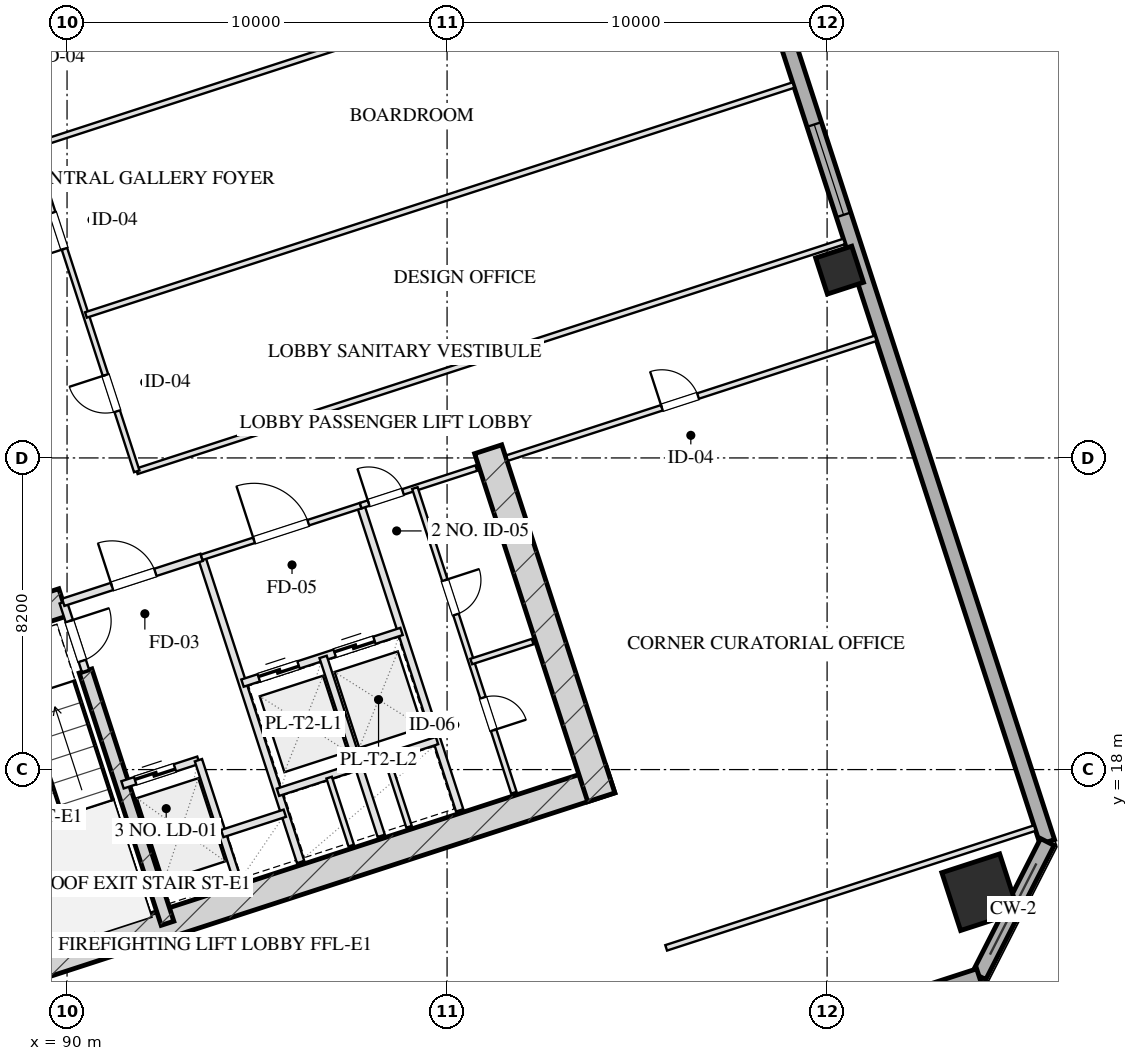
"""IFC4 building model, lengths in metres.
Left out: names, types, materials, properties, quantities, classifications, styles, units other than length and angle.
Written with IfcOpenShell. Run it as: python <this file> out.ifc"""

import sys

from ifc_helpers import new_model, si_unit, direction, frame, frame_2d, origin, origin_2d, place, context, subcontext, project, spatial, rectangle, hollow_rectangle, extrude, element, fill, save


model = new_model("IFC4")
c1 = context("Model", 3, precision=1e-05, world=origin(), true_north=direction((0.0, 1.0)))
c2 = subcontext(c1, "Body", "Model", "MODEL_VIEW")
j1 = project(units=[si_unit("LENGTHUNIT", "METRE"), si_unit("PLANEANGLEUNIT", "RADIAN")], contexts=[c1])
p1 = place(None, origin())
s1 = spatial("IfcSite", under=j1, at=p1, CompositionType="ELEMENT")
p2 = place(p1, origin())
s2 = spatial("IfcBuilding", under=s1, at=p2, CompositionType="ELEMENT")
p3 = place(p2, frame((0.0, 0.0, 30.0)))
s3 = spatial("IfcBuildingStorey", under=s2, at=p3, CompositionType="ELEMENT", Elevation=30.0)
p4 = place(p3, frame((88.559, 12.629, 0.0), z_axis=(0.0, 0.0, 1.0), x_axis=(0.951056072937, 0.309018358888, 0.0)))
e1 = element("IfcWall", 1, at=p4, inside=s3, PredefinedType="SHEAR", context=c2, shape_type="SweptSolid", body=[
    extrude(rectangle(XDim=16.55, YDim=0.75, at=frame_2d((8.275, 0.0))), origin(), (0.0, 0.0, 1.0), 4.0),
])
p5 = place(p3, frame((101.082, 26.429, 0.0), z_axis=(0.0, 0.0, 1.0), x_axis=(0.309016134813, -0.951056795583, 0.0)))
e2 = element("IfcWall", 2, at=p5, inside=s3, PredefinedType="SHEAR", context=c2, shape_type="SweptSolid", body=[
    extrude(rectangle(XDim=9.63, YDim=0.75, at=frame_2d((4.815, 0.0))), origin(), (0.0, 0.0, 1.0), 4.0),
])
p6 = place(p3, frame((90.486, 20.594, 0.0), z_axis=(0.0, 0.0, 1.0), x_axis=(0.309020428229, -0.951055400562, 0.0)))
e3 = element("IfcWall", 3, at=p6, inside=s3, PredefinedType="SHEAR", context=c2, shape_type="SweptSolid", body=[
    extrude(rectangle(XDim=6.98, YDim=0.35, at=frame_2d((3.49, 0.0))), origin(), (0.0, 0.0, 1.0), 4.0),
])
p7 = place(p3, frame((85.814, 21.074, 0.0), z_axis=(0.0, 0.0, 1.0), x_axis=(0.95106580992, 0.308988390074, 0.0)))
e4 = element("IfcWall", 4, at=p7, inside=s3, PredefinedType="SHEAR", context=c2, shape_type="SweptSolid", body=[
    extrude(rectangle(XDim=4.295, YDim=0.75, at=frame_2d((2.147, 0.0))), origin(), (0.0, 0.0, 1.0), 4.0),
])
p8 = place(p3, frame((114.027, 14.774, 0.0), z_axis=(0.0, 0.0, 1.0), x_axis=(0.951056516295, 0.309016994375, 0.0)))
e5 = element("IfcColumn", 5, at=p8, inside=s3, PredefinedType="COLUMN", context=c2, shape_type="SweptSolid", body=[
    extrude(hollow_rectangle(XDim=1.6, YDim=1.6, WallThickness=0.055, at=origin_2d()), origin(), (0.0, 0.0, 1.0), 4.001),
])
p9 = place(p3, frame((110.328, 31.142, 0.0), z_axis=(0.0, 0.0, 1.0), x_axis=(0.951056516295, 0.309016994375, 0.0)))
e6 = element("IfcColumn", 6, at=p9, inside=s3, PredefinedType="COLUMN", context=c2, shape_type="SweptSolid", body=[
    extrude(hollow_rectangle(XDim=1.0, YDim=1.0, WallThickness=0.036, at=origin_2d()), origin(), (0.0, 0.0, 1.0), 4.001),
])
p10 = place(p3, frame((100.345, 63.648, 0.0), z_axis=(0.0, 0.0, 1.0), x_axis=(0.309014526607, -0.951057318118, 0.0)))
e7 = element("IfcWall", 7, at=p10, inside=s3, PredefinedType="SOLIDWALL", context=c2, shape_type="SweptSolid", body=[
    extrude(rectangle(XDim=50.0, YDim=0.4, at=frame_2d((25.0, 0.0))), origin(), (0.0, 0.0, 1.0), 3.16),
])
p11 = place(p10, frame((30.15, 0.0, 0.75)))
e8 = element("IfcOpeningElement", 8, at=p11, cuts=e7, PredefinedType="OPENING", context=c2, shape_type="SweptSolid", body=[
    extrude(rectangle(XDim=2.5, YDim=1.75, at=frame_2d((1.25, 0.875))), frame((0.0, 0.21, 0.0), z_axis=(0.0, -1.0, 0.0), x_axis=(1.0, 0.0, 0.0)), (0.0, 0.0, 1.0), 0.42),
])
p12 = place(p10, frame((21.15, 0.0, 0.75)))
e9 = element("IfcOpeningElement", 9, at=p12, cuts=e7, PredefinedType="OPENING", context=c2, shape_type="SweptSolid", body=[
    extrude(rectangle(XDim=2.5, YDim=1.75, at=frame_2d((1.25, 0.875))), frame((0.0, 0.21, 0.0), z_axis=(0.0, -1.0, 0.0), x_axis=(1.0, 0.0, 0.0)), (0.0, 0.0, 1.0), 0.42),
])
p13 = place(p3, frame((115.795, 16.095, 0.0), z_axis=(0.0, 0.0, 1.0), x_axis=(-0.453958106755, -0.891023028497, 0.0)))
e10 = element("IfcWall", 10, at=p13, inside=s3, PredefinedType="SOLIDWALL", context=c2, shape_type="SweptSolid", body=[
    extrude(rectangle(XDim=3.96, YDim=0.4, at=frame_2d((1.98, 0.0))), origin(), (0.0, 0.0, 1.0), 3.16),
])
p14 = place(p3, frame((113.998, 12.567, 0.0), z_axis=(0.0, 0.0, 1.0), x_axis=(-0.951055939317, -0.309018770125, 0.0)))
e11 = element("IfcWall", 11, at=p14, inside=s3, PredefinedType="SOLIDWALL", context=c2, shape_type="SweptSolid", body=[
    extrude(rectangle(XDim=32.4, YDim=0.4, at=frame_2d((16.2, 0.0))), origin(), (0.0, 0.0, 1.0), 3.16),
])
p15 = place(p3, frame((89.899, 22.401, 0.0), z_axis=(0.0, 0.0, 1.0), x_axis=(0.308932062672, -0.951084108086, 0.0)))
e12 = element("IfcWall", 12, at=p15, inside=s3, PredefinedType="PARTITIONING", context=c2, shape_type="SweptSolid", body=[
    extrude(rectangle(XDim=1.9, YDim=0.2, at=frame_2d((0.95, 0.0))), origin(), (0.0, 0.0, 1.0), 3.725),
])
p16 = place(p15, frame((0.52, 0.0, 0.0)))
e13 = element("IfcOpeningElement", 13, at=p16, cuts=e12, PredefinedType="OPENING", context=c2, shape_type="SweptSolid", body=[
    extrude(rectangle(XDim=1.1, YDim=2.05, at=frame_2d((0.55, 1.025))), frame((0.0, 0.11, 0.0), z_axis=(0.0, -1.0, 0.0), x_axis=(1.0, 0.0, 0.0)), (0.0, 0.0, 1.0), 0.22),
])
p17 = place(p3, frame((93.542, 23.585, 0.0), z_axis=(0.0, 0.0, 1.0), x_axis=(0.309042196757, -0.951048327176, 0.0)))
e14 = element("IfcWall", 14, at=p17, inside=s3, PredefinedType="PARTITIONING", context=c2, shape_type="SweptSolid", body=[
    extrude(rectangle(XDim=8.43, YDim=0.2, at=frame_2d((4.215, 0.0))), origin(), (0.0, 0.0, 1.0), 3.725),
])
p18 = place(p3, frame((89.899, 22.401, 0.0), z_axis=(0.0, 0.0, 1.0), x_axis=(0.951046716504, 0.309047153403, 0.0)))
e15 = element("IfcWall", 15, at=p18, inside=s3, PredefinedType="PARTITIONING", context=c2, shape_type="SweptSolid", body=[
    extrude(rectangle(XDim=3.83, YDim=0.2, at=frame_2d((1.915, 0.0))), origin(), (0.0, 0.0, 1.0), 3.725),
])
p19 = place(p18, frame((1.35, 0.0, 0.0)))
e16 = element("IfcOpeningElement", 16, at=p19, cuts=e15, PredefinedType="OPENING", context=c2, shape_type="SweptSolid", body=[
    extrude(rectangle(XDim=1.2, YDim=2.05, at=frame_2d((0.6, 1.025))), frame((0.0, 0.11, 0.0), z_axis=(0.0, -1.0, 0.0), x_axis=(1.0, 0.0, 0.0)), (0.0, 0.0, 1.0), 0.22),
])
p20 = place(p3, frame((91.46, 17.598, 0.0), z_axis=(0.0, 0.0, 1.0), x_axis=(0.951062257173, 0.308999325213, 0.0)))
e17 = element("IfcWall", 17, at=p20, inside=s3, PredefinedType="PARTITIONING", context=c2, shape_type="SweptSolid", body=[
    extrude(rectangle(XDim=2.1, YDim=0.2, at=frame_2d((1.05, 0.0))), origin(), (0.0, 0.0, 1.0), 3.725),
])
p21 = place(p20, frame((0.35, 0.0, 0.0)))
e18 = element("IfcOpeningElement", 18, at=p21, cuts=e17, PredefinedType="OPENING", context=c2, shape_type="SweptSolid", body=[
    extrude(rectangle(XDim=1.1, YDim=2.05, at=frame_2d((0.55, 1.025))), frame((0.0, 0.11, 0.0), z_axis=(0.0, -1.0, 0.0), x_axis=(1.0, 0.0, 0.0)), (0.0, 0.0, 1.0), 0.22),
])
p22 = place(p3, frame((93.457, 18.247, 0.0), z_axis=(0.0, 0.0, 1.0), x_axis=(0.3089935693, -0.951064127245, 0.0)))
e19 = element("IfcWall", 19, at=p22, inside=s3, PredefinedType="PARTITIONING", context=c2, shape_type="SweptSolid", body=[
    extrude(rectangle(XDim=3.7, YDim=0.2, at=frame_2d((1.85, 0.0))), origin(), (0.0, 0.0, 1.0), 3.725),
])
p23 = place(p3, frame((94.084, 16.317, 0.0), z_axis=(0.0, 0.0, 1.0), x_axis=(0.951041328149, 0.309063734775, 0.0)))
e20 = element("IfcWall", 20, at=p23, inside=s3, PredefinedType="PARTITIONING", context=c2, shape_type="SweptSolid", body=[
    extrude(rectangle(XDim=1.73, YDim=0.2, at=frame_2d((0.865, 0.0))), origin(), (0.0, 0.0, 1.0), 3.725),
])
p24 = place(p3, frame((97.727, 24.944, 0.0), z_axis=(0.0, 0.0, 1.0), x_axis=(0.309016001439, -0.951056838919, 0.0)))
e21 = element("IfcWall", 21, at=p24, inside=s3, PredefinedType="PARTITIONING", context=c2, shape_type="SweptSolid", body=[
    extrude(rectangle(XDim=8.43, YDim=0.2, at=frame_2d((4.215, 0.0))), origin(), (0.0, 0.0, 1.0), 3.725),
])
p25 = place(p3, frame((93.542, 23.585, 0.0), z_axis=(0.0, 0.0, 1.0), x_axis=(0.951063829732, 0.308994485023, 0.0)))
e22 = element("IfcWall", 22, at=p25, inside=s3, PredefinedType="PARTITIONING", context=c2, shape_type="SweptSolid", body=[
    extrude(rectangle(XDim=4.4, YDim=0.15, at=frame_2d((2.2, 0.0))), origin(), (0.0, 0.0, 1.0), 3.725),
])
p26 = place(p25, frame((1.45, 0.0, 0.0)))
e23 = element("IfcOpeningElement", 23, at=p26, cuts=e22, PredefinedType="OPENING", context=c2, shape_type="SweptSolid", body=[
    extrude(rectangle(XDim=1.5, YDim=2.05, at=frame_2d((0.75, 1.025))), frame((0.0, 0.085, 0.0), z_axis=(0.0, -1.0, 0.0), x_axis=(1.0, 0.0, 0.0)), (0.0, 0.0, 1.0), 0.17),
])
p27 = place(p3, frame((94.617, 20.275, 0.0), z_axis=(0.0, 0.0, 1.0), x_axis=(0.951058531764, 0.30901079133, 0.0)))
e24 = element("IfcWall", 24, at=p27, inside=s3, PredefinedType="PARTITIONING", context=c2, shape_type="SweptSolid", body=[
    extrude(rectangle(XDim=4.4, YDim=0.2, at=frame_2d((2.2, 0.0))), origin(), (0.0, 0.0, 1.0), 3.725),
])
p28 = place(p27, frame((0.45, 0.0, 0.0)))
e25 = element("IfcOpeningElement", 25, at=p28, cuts=e24, PredefinedType="OPENING", context=c2, shape_type="SweptSolid", body=[
    extrude(rectangle(XDim=1.1, YDim=2.05, at=frame_2d((0.55, 1.025))), frame((0.0, 0.11, 0.0), z_axis=(0.0, -1.0, 0.0), x_axis=(1.0, 0.0, 0.0)), (0.0, 0.0, 1.0), 0.22),
])
p29 = place(p27, frame((2.55, 0.0, 0.0)))
e26 = element("IfcOpeningElement", 26, at=p29, cuts=e24, PredefinedType="OPENING", context=c2, shape_type="SweptSolid", body=[
    extrude(rectangle(XDim=1.1, YDim=2.05, at=frame_2d((0.55, 1.025))), frame((0.0, 0.11, 0.0), z_axis=(0.0, -1.0, 0.0), x_axis=(1.0, 0.0, 0.0)), (0.0, 0.0, 1.0), 0.22),
])
p30 = place(p3, frame((96.738, 20.964, 0.0), z_axis=(0.0, 0.0, 1.0), x_axis=(0.309042578481, -0.951048203135, 0.0)))
e27 = element("IfcWall", 27, at=p30, inside=s3, PredefinedType="PARTITIONING", context=c2, shape_type="SweptSolid", body=[
    extrude(rectangle(XDim=4.95, YDim=0.2, at=frame_2d((2.475, 0.0))), origin(), (0.0, 0.0, 1.0), 3.725),
])
p31 = place(p3, frame((95.551, 17.403, 0.0), z_axis=(0.0, 0.0, 1.0), x_axis=(0.951058531764, 0.30901079133, 0.0)))
e28 = element("IfcWall", 28, at=p31, inside=s3, PredefinedType="PARTITIONING", context=c2, shape_type="SweptSolid", body=[
    extrude(rectangle(XDim=4.4, YDim=0.2, at=frame_2d((2.2, 0.0))), origin(), (0.0, 0.0, 1.0), 3.725),
])
p32 = place(p3, frame((96.897, 17.788, 0.0), z_axis=(0.0, 0.0, 1.0), x_axis=(0.30897153969, -0.951071284217, 0.0)))
e29 = element("IfcWall", 29, at=p32, inside=s3, PredefinedType="PARTITIONING", context=c2, shape_type="SweptSolid", body=[
    extrude(rectangle(XDim=1.88, YDim=0.15, at=frame_2d((0.94, 0.0))), origin(), (0.0, 0.0, 1.0), 3.725),
])
p33 = place(p3, frame((98.419, 18.282, 0.0), z_axis=(0.0, 0.0, 1.0), x_axis=(0.308933380006, -0.951083680187, 0.0)))
e30 = element("IfcWall", 30, at=p33, inside=s3, PredefinedType="PARTITIONING", context=c2, shape_type="SweptSolid", body=[
    extrude(rectangle(XDim=1.88, YDim=0.15, at=frame_2d((0.94, 0.0))), origin(), (0.0, 0.0, 1.0), 3.725),
])
p34 = place(p3, frame((97.727, 24.944, 0.0), z_axis=(0.0, 0.0, 1.0), x_axis=(0.951036872128, 0.309077446369, 0.0)))
e31 = element("IfcWall", 31, at=p34, inside=s3, PredefinedType="PARTITIONING", context=c2, shape_type="SweptSolid", body=[
    extrude(rectangle(XDim=3.2, YDim=0.15, at=frame_2d((1.6, 0.0))), origin(), (0.0, 0.0, 1.0), 3.725),
])
p35 = place(p34, frame((0.22, 0.0, 0.0)))
e32 = element("IfcOpeningElement", 32, at=p35, cuts=e31, PredefinedType="OPENING", context=c2, shape_type="SweptSolid", body=[
    extrude(rectangle(XDim=0.95, YDim=2.05, at=frame_2d((0.475, 1.025))), frame((0.0, 0.085, 0.0), z_axis=(0.0, -1.0, 0.0), x_axis=(1.0, 0.0, 0.0)), (0.0, 0.0, 1.0), 0.17),
])
p36 = place(p3, frame((99.153, 25.408, 0.0), z_axis=(0.0, 0.0, 1.0), x_axis=(0.309016001439, -0.951056838919, 0.0)))
e33 = element("IfcWall", 33, at=p36, inside=s3, PredefinedType="PARTITIONING", context=c2, shape_type="SweptSolid", body=[
    extrude(rectangle(XDim=8.43, YDim=0.15, at=frame_2d((4.215, 0.0))), origin(), (0.0, 0.0, 1.0), 3.725),
])
p37 = place(p36, frame((2.55, 0.0, 0.0)))
e34 = element("IfcOpeningElement", 34, at=p37, cuts=e33, PredefinedType="OPENING", context=c2, shape_type="SweptSolid", body=[
    extrude(rectangle(XDim=0.95, YDim=2.05, at=frame_2d((0.475, 1.025))), frame((0.0, 0.085, 0.0), z_axis=(0.0, -1.0, 0.0), x_axis=(1.0, 0.0, 0.0)), (0.0, 0.0, 1.0), 0.17),
])
p38 = place(p36, frame((5.8, 0.0, 0.0)))
e35 = element("IfcOpeningElement", 35, at=p38, cuts=e33, PredefinedType="OPENING", context=c2, shape_type="SweptSolid", body=[
    extrude(rectangle(XDim=0.9, YDim=2.05, at=frame_2d((0.45, 1.025))), frame((0.0, 0.085, 0.0), z_axis=(0.0, -1.0, 0.0), x_axis=(1.0, 0.0, 0.0)), (0.0, 0.0, 1.0), 0.17),
])
p39 = place(p3, frame((100.636, 20.843, 0.0), z_axis=(0.0, 0.0, 1.0), x_axis=(0.951040401051, 0.309066587596, 0.0)))
e36 = element("IfcWall", 36, at=p39, inside=s3, PredefinedType="PARTITIONING", context=c2, shape_type="SweptSolid", body=[
    extrude(rectangle(XDim=1.7, YDim=0.15, at=frame_2d((0.85, 0.0))), origin(), (0.0, 0.0, 1.0), 3.725),
])
p40 = place(p3, frame((105.765, 13.309, 0.0), z_axis=(0.0, 0.0, 1.0), x_axis=(0.951054294345, 0.309023832749, 0.0)))
e37 = element("IfcWall", 37, at=p40, inside=s3, PredefinedType="PARTITIONING", context=c2, shape_type="SweptSolid", body=[
    extrude(rectangle(XDim=10.2, YDim=0.15, at=frame_2d((5.1, 0.0))), origin(), (0.0, 0.0, 1.0), 3.725),
])
p41 = place(p3, frame((101.578, 26.196, 0.0), z_axis=(0.0, 0.0, 1.0), x_axis=(0.951059043131, 0.309009217467, 0.0)))
e38 = element("IfcWall", 38, at=p41, inside=s3, PredefinedType="PARTITIONING", context=c2, shape_type="SweptSolid", body=[
    extrude(rectangle(XDim=10.2, YDim=0.15, at=frame_2d((5.1, 0.0))), origin(), (0.0, 0.0, 1.0), 3.725),
])
p42 = place(p41, frame((4.284, 0.0, 0.0)))
e39 = element("IfcOpeningElement", 39, at=p42, cuts=e38, PredefinedType="OPENING", context=c2, shape_type="SweptSolid", body=[
    extrude(rectangle(XDim=1.0, YDim=2.05, at=frame_2d((0.5, 1.025))), frame((0.0, 0.085, 0.0), z_axis=(0.0, -1.0, 0.0), x_axis=(1.0, 0.0, 0.0)), (0.0, 0.0, 1.0), 0.17),
])
p43 = place(p3, frame((91.834, 25.848, 0.0), z_axis=(0.0, 0.0, 1.0), x_axis=(0.951055605195, 0.309019798438, 0.0)))
e40 = element("IfcWall", 40, at=p43, inside=s3, PredefinedType="PARTITIONING", context=c2, shape_type="SweptSolid", body=[
    extrude(rectangle(XDim=19.575, YDim=0.15, at=frame_2d((9.788, 0.0))), origin(), (0.0, 0.0, 1.0), 3.725),
])
p44 = place(p3, frame((91.834, 25.848, 0.0), z_axis=(0.0, 0.0, 1.0), x_axis=(-0.30901773025, 0.951056277195, 0.0)))
e41 = element("IfcWall", 41, at=p44, inside=s3, PredefinedType="PARTITIONING", context=c2, shape_type="SweptSolid", body=[
    extrude(rectangle(XDim=16.64, YDim=0.15, at=frame_2d((8.32, 0.0))), origin(), (0.0, 0.0, 1.0), 3.725),
])
p45 = place(p44, frame((1.663, 0.0, 0.0)))
e42 = element("IfcOpeningElement", 42, at=p45, cuts=e41, PredefinedType="OPENING", context=c2, shape_type="SweptSolid", body=[
    extrude(rectangle(XDim=1.0, YDim=2.05, at=frame_2d((0.5, 1.025))), frame((0.0, 0.085, 0.0), z_axis=(0.0, -1.0, 0.0), x_axis=(1.0, 0.0, 0.0)), (0.0, 0.0, 1.0), 0.17),
])
p46 = place(p44, frame((6.156, 0.0, 0.0)))
e43 = element("IfcOpeningElement", 43, at=p46, cuts=e41, PredefinedType="OPENING", context=c2, shape_type="SweptSolid", body=[
    extrude(rectangle(XDim=1.0, YDim=2.05, at=frame_2d((0.5, 1.025))), frame((0.0, 0.085, 0.0), z_axis=(0.0, -1.0, 0.0), x_axis=(1.0, 0.0, 0.0)), (0.0, 0.0, 1.0), 0.17),
])
p47 = place(p44, frame((10.649, 0.0, 0.0)))
e44 = element("IfcOpeningElement", 44, at=p47, cuts=e41, PredefinedType="OPENING", context=c2, shape_type="SweptSolid", body=[
    extrude(rectangle(XDim=1.0, YDim=2.05, at=frame_2d((0.5, 1.025))), frame((0.0, 0.085, 0.0), z_axis=(0.0, -1.0, 0.0), x_axis=(1.0, 0.0, 0.0)), (0.0, 0.0, 1.0), 0.17),
])
p48 = place(p44, frame((14.476, 0.0, 0.0)))
e45 = element("IfcOpeningElement", 45, at=p48, cuts=e41, PredefinedType="OPENING", context=c2, shape_type="SweptSolid", body=[
    extrude(rectangle(XDim=1.0, YDim=2.05, at=frame_2d((0.5, 1.025))), frame((0.0, 0.085, 0.0), z_axis=(0.0, -1.0, 0.0), x_axis=(1.0, 0.0, 0.0)), (0.0, 0.0, 1.0), 0.17),
])
for number, where, z_axis, x_axis in (
    (46, (90.497, 29.962, 0.0), (0.0, 0.0, 1.0), (0.951, 0.309, 0.0)),
    (47, (89.057, 34.394, 0.0), (0.0, 0.0, 1.0), (0.951, 0.309, 0.0)),
):
    element("IfcWall", number, at=place(p3, frame(where, z_axis=z_axis, x_axis=x_axis)), inside=s3, PredefinedType="PARTITIONING", context=c2, shape_type="SweptSolid", body=[
        extrude(rectangle(XDim=19.575, YDim=0.15, at=frame_2d((9.788, 0.0))), origin(), (0.0, 0.0, 1.0), 3.725),
    ])
p49 = place(p11, origin())
e48 = element("IfcWindow", 48, at=p49, inside=s3, PartitioningType="TRIPLE_PANEL_VERTICAL", PredefinedType="WINDOW", context=c2, shape_type="SweptSolid", body=[
    extrude(rectangle(XDim=2.5, YDim=1.75, at=frame_2d((1.25, 0.875))), frame((0.0, 0.03, 0.0), z_axis=(0.0, -1.0, 0.0), x_axis=(1.0, 0.0, 0.0)), (0.0, 0.0, 1.0), 0.06),
])
fill(e8, e48)
p50 = place(p16, origin())
e49 = element("IfcDoor", 49, at=p50, inside=s3, OperationType="SINGLE_SWING_LEFT", PredefinedType="DOOR", context=c2, shape_type="SweptSolid", body=[
    extrude(rectangle(XDim=1.1, YDim=2.05, at=frame_2d((0.55, 1.025))), frame((0.0, 0.025, 0.0), z_axis=(0.0, -1.0, 0.0), x_axis=(1.0, 0.0, 0.0)), (0.0, 0.0, 1.0), 0.05),
])
fill(e13, e49)
p51 = place(p19, origin())
e50 = element("IfcDoor", 50, at=p51, inside=s3, OperationType="SINGLE_SWING_LEFT", PredefinedType="DOOR", context=c2, shape_type="SweptSolid", body=[
    extrude(rectangle(XDim=1.2, YDim=2.05, at=frame_2d((0.6, 1.025))), frame((0.0, 0.025, 0.0), z_axis=(0.0, -1.0, 0.0), x_axis=(1.0, 0.0, 0.0)), (0.0, 0.0, 1.0), 0.05),
])
fill(e16, e50)
p52 = place(p21, origin())
e51 = element("IfcDoor", 51, at=p52, inside=s3, OperationType="DOUBLE_DOOR_SLIDING", PredefinedType="DOOR", context=c2, shape_type="SweptSolid", body=[
    extrude(rectangle(XDim=1.1, YDim=2.05, at=frame_2d((0.55, 1.025))), frame((0.0, 0.025, 0.0), z_axis=(0.0, -1.0, 0.0), x_axis=(1.0, 0.0, 0.0)), (0.0, 0.0, 1.0), 0.05),
])
fill(e18, e51)
p53 = place(p26, origin())
e52 = element("IfcDoor", 52, at=p53, inside=s3, OperationType="SINGLE_SWING_LEFT", PredefinedType="DOOR", context=c2, shape_type="SweptSolid", body=[
    extrude(rectangle(XDim=1.5, YDim=2.05, at=frame_2d((0.75, 1.025))), frame((0.0, 0.025, 0.0), z_axis=(0.0, -1.0, 0.0), x_axis=(1.0, 0.0, 0.0)), (0.0, 0.0, 1.0), 0.05),
])
fill(e23, e52)
p54 = place(p28, origin())
e53 = element("IfcDoor", 53, at=p54, inside=s3, OperationType="DOUBLE_DOOR_SLIDING", PredefinedType="DOOR", context=c2, shape_type="SweptSolid", body=[
    extrude(rectangle(XDim=1.1, YDim=2.05, at=frame_2d((0.55, 1.025))), frame((0.0, 0.025, 0.0), z_axis=(0.0, -1.0, 0.0), x_axis=(1.0, 0.0, 0.0)), (0.0, 0.0, 1.0), 0.05),
])
fill(e25, e53)
p55 = place(p29, origin())
e54 = element("IfcDoor", 54, at=p55, inside=s3, OperationType="DOUBLE_DOOR_SLIDING", PredefinedType="DOOR", context=c2, shape_type="SweptSolid", body=[
    extrude(rectangle(XDim=1.1, YDim=2.05, at=frame_2d((0.55, 1.025))), frame((0.0, 0.025, 0.0), z_axis=(0.0, -1.0, 0.0), x_axis=(1.0, 0.0, 0.0)), (0.0, 0.0, 1.0), 0.05),
])
fill(e26, e54)
p56 = place(p35, origin())
e55 = element("IfcDoor", 55, at=p56, inside=s3, OperationType="SINGLE_SWING_LEFT", PredefinedType="DOOR", context=c2, shape_type="SweptSolid", body=[
    extrude(rectangle(XDim=0.95, YDim=2.05, at=frame_2d((0.475, 1.025))), frame((0.0, 0.025, 0.0), z_axis=(0.0, -1.0, 0.0), x_axis=(1.0, 0.0, 0.0)), (0.0, 0.0, 1.0), 0.05),
])
fill(e32, e55)
p57 = place(p37, origin())
e56 = element("IfcDoor", 56, at=p57, inside=s3, OperationType="SINGLE_SWING_LEFT", PredefinedType="DOOR", context=c2, shape_type="SweptSolid", body=[
    extrude(rectangle(XDim=0.95, YDim=2.05, at=frame_2d((0.475, 1.025))), frame((0.0, 0.025, 0.0), z_axis=(0.0, -1.0, 0.0), x_axis=(1.0, 0.0, 0.0)), (0.0, 0.0, 1.0), 0.05),
])
fill(e34, e56)
p58 = place(p38, origin())
e57 = element("IfcDoor", 57, at=p58, inside=s3, OperationType="SINGLE_SWING_RIGHT", PredefinedType="DOOR", context=c2, shape_type="SweptSolid", body=[
    extrude(rectangle(XDim=0.9, YDim=2.05, at=frame_2d((0.45, 1.025))), frame((0.0, 0.025, 0.0), z_axis=(0.0, -1.0, 0.0), x_axis=(1.0, 0.0, 0.0)), (0.0, 0.0, 1.0), 0.05),
])
fill(e35, e57)
p59 = place(p42, origin())
e58 = element("IfcDoor", 58, at=p59, inside=s3, OperationType="SINGLE_SWING_LEFT", PredefinedType="DOOR", context=c2, shape_type="SweptSolid", body=[
    extrude(rectangle(XDim=1.0, YDim=2.05, at=frame_2d((0.5, 1.025))), frame((0.0, 0.025, 0.0), z_axis=(0.0, -1.0, 0.0), x_axis=(1.0, 0.0, 0.0)), (0.0, 0.0, 1.0), 0.05),
])
fill(e39, e58)
p60 = place(p45, origin())
e59 = element("IfcDoor", 59, at=p60, inside=s3, OperationType="SINGLE_SWING_RIGHT", PredefinedType="DOOR", context=c2, shape_type="SweptSolid", body=[
    extrude(rectangle(XDim=1.0, YDim=2.05, at=frame_2d((0.5, 1.025))), frame((0.0, 0.025, 0.0), z_axis=(0.0, -1.0, 0.0), x_axis=(1.0, 0.0, 0.0)), (0.0, 0.0, 1.0), 0.05),
])
fill(e42, e59)
p61 = place(p46, origin())
e60 = element("IfcDoor", 60, at=p61, inside=s3, OperationType="SINGLE_SWING_LEFT", PredefinedType="DOOR", context=c2, shape_type="SweptSolid", body=[
    extrude(rectangle(XDim=1.0, YDim=2.05, at=frame_2d((0.5, 1.025))), frame((0.0, 0.025, 0.0), z_axis=(0.0, -1.0, 0.0), x_axis=(1.0, 0.0, 0.0)), (0.0, 0.0, 1.0), 0.05),
])
fill(e43, e60)
save(model, sys.argv[1])
